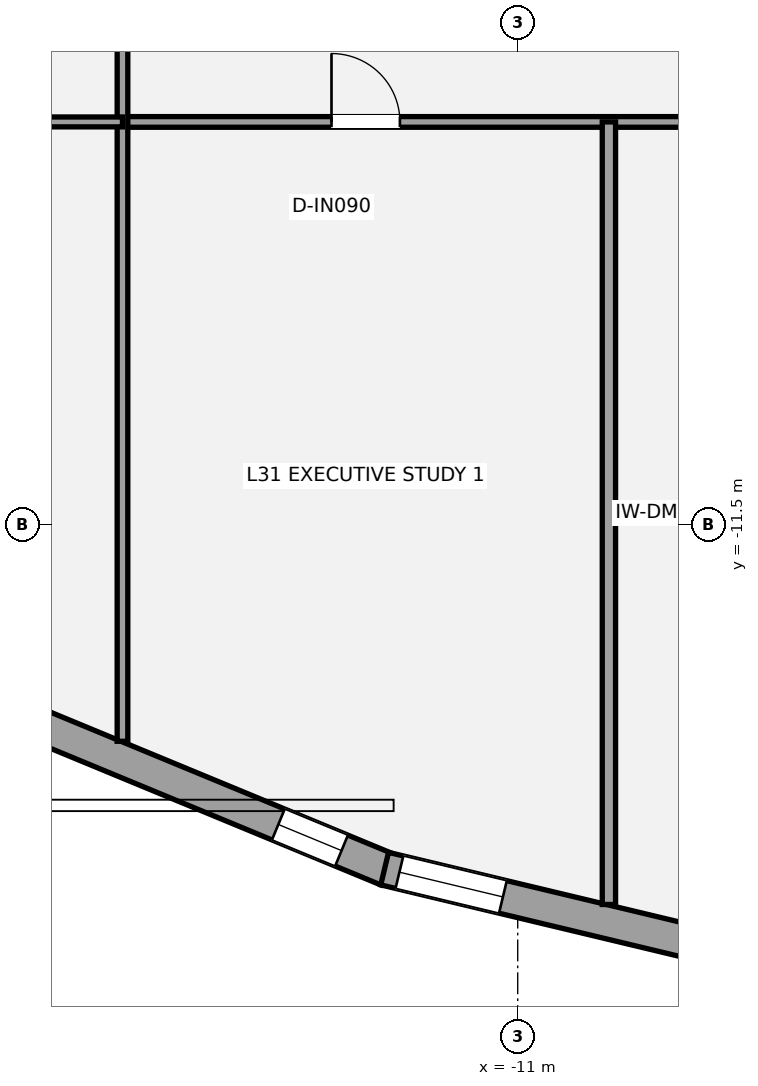
"""IFC4 building model, lengths in metres.
Left out: names, types, materials, properties, quantities, classifications, styles, units other than length and angle.
Written with IfcOpenShell. Run it as: python <this file> out.ifc"""

import sys

from ifc_helpers import new_model, si_unit, direction, frame, frame_2d, origin, place, context, subcontext, project, spatial, rectangle, extrude, element, fill, save


model = new_model("IFC4")
c1 = context("Model", 3, precision=1e-05, world=origin(), true_north=direction((0.0, 1.0)))
c2 = subcontext(c1, "Body", "Model", "MODEL_VIEW")
j1 = project(units=[si_unit("LENGTHUNIT", "METRE"), si_unit("PLANEANGLEUNIT", "RADIAN")], contexts=[c1])
p1 = place(None, origin())
s1 = spatial("IfcSite", under=j1, at=p1, CompositionType="ELEMENT")
p2 = place(p1, origin())
s2 = spatial("IfcBuilding", under=s1, at=p2, CompositionType="ELEMENT")
p3 = place(p2, frame((0.0, 0.0, 117.6)))
s3 = spatial("IfcBuildingStorey", under=s2, at=p3, CompositionType="ELEMENT", Elevation=117.6)
p4 = place(p3, frame((-12.718, -16.034, 0.0), z_axis=(0.0, 0.0, 1.0), x_axis=(-0.924140141084, 0.382053660678, 0.0)))
e1 = element("IfcWall", 1, at=p4, inside=s3, PredefinedType="STANDARD", context=c2, shape_type="SweptSolid", body=[
    extrude(rectangle(XDim=4.943, YDim=0.44, at=frame_2d((2.471, 0.0))), origin(), (0.0, 0.0, 1.0), 2.528),
])
p5 = place(p4, frame((0.649, 0.0, 0.58)))
e2 = element("IfcOpeningElement", 2, at=p5, cuts=e1, PredefinedType="OPENING", context=c2, shape_type="SweptSolid", body=[
    extrude(rectangle(XDim=0.9, YDim=1.35, at=frame_2d((0.45, 0.675))), frame((0.0, 0.23, 0.0), z_axis=(0.0, -1.0, 0.0), x_axis=(1.0, 0.0, 0.0)), (0.0, 0.0, 1.0), 0.46),
])
p6 = place(p3, frame((-7.75, -17.22, 0.0), z_axis=(0.0, 0.0, 1.0), x_axis=(-0.972539655933, 0.232737228734, 0.0)))
e3 = element("IfcWall", 3, at=p6, inside=s3, PredefinedType="STANDARD", context=c2, shape_type="SweptSolid", body=[
    extrude(rectangle(XDim=5.142, YDim=0.44, at=frame_2d((2.571, 0.0))), origin(), (0.0, 0.0, 1.0), 2.528),
])
p7 = place(p6, frame((3.542, 0.0, 0.58)))
e4 = element("IfcOpeningElement", 4, at=p7, cuts=e3, PredefinedType="OPENING", context=c2, shape_type="SweptSolid", body=[
    extrude(rectangle(XDim=1.4, YDim=1.55, at=frame_2d((0.7, 0.775))), frame((0.0, 0.23, 0.0), z_axis=(0.0, -1.0, 0.0), x_axis=(1.0, 0.0, 0.0)), (0.0, 0.0, 1.0), 0.46),
])
p8 = place(p3, frame((-16.2, -6.2, 0.0), z_axis=(0.0, 0.0, 1.0), x_axis=(1.0, 0.0, 0.0)))
e5 = element("IfcWall", 5, at=p8, inside=s3, PredefinedType="PARTITIONING", context=c2, shape_type="SweptSolid", body=[
    extrude(rectangle(XDim=34.0, YDim=0.14, at=frame_2d((17.0, 0.0))), origin(), (0.0, 0.0, 1.0), 2.688),
])
p9 = place(p8, frame((2.75, 0.0, 0.0)))
e6 = element("IfcOpeningElement", 6, at=p9, cuts=e5, PredefinedType="OPENING", context=c2, shape_type="SweptSolid", body=[
    extrude(rectangle(XDim=0.9, YDim=2.1, at=frame_2d((0.45, 1.05))), frame((0.0, 0.08, 0.0), z_axis=(0.0, -1.0, 0.0), x_axis=(1.0, 0.0, 0.0)), (0.0, 0.0, 1.0), 0.16),
])
p10 = place(p8, frame((9.45, 0.0, 0.0)))
e7 = element("IfcOpeningElement", 7, at=p10, cuts=e5, PredefinedType="OPENING", context=c2, shape_type="SweptSolid", body=[
    extrude(rectangle(XDim=0.9, YDim=2.1, at=frame_2d((0.45, 1.05))), frame((0.0, 0.08, 0.0), z_axis=(0.0, -1.0, 0.0), x_axis=(1.0, 0.0, 0.0)), (0.0, 0.0, 1.0), 0.16),
])
p11 = place(p8, frame((16.45, 0.0, 0.0)))
e8 = element("IfcOpeningElement", 8, at=p11, cuts=e5, PredefinedType="OPENING", context=c2, shape_type="SweptSolid", body=[
    extrude(rectangle(XDim=0.9, YDim=2.1, at=frame_2d((0.45, 1.05))), frame((0.0, 0.08, 0.0), z_axis=(0.0, -1.0, 0.0), x_axis=(1.0, 0.0, 0.0)), (0.0, 0.0, 1.0), 0.16),
])
p12 = place(p8, frame((22.95, 0.0, 0.0)))
e9 = element("IfcOpeningElement", 9, at=p12, cuts=e5, PredefinedType="OPENING", context=c2, shape_type="SweptSolid", body=[
    extrude(rectangle(XDim=0.9, YDim=2.1, at=frame_2d((0.45, 1.05))), frame((0.0, 0.08, 0.0), z_axis=(0.0, -1.0, 0.0), x_axis=(1.0, 0.0, 0.0)), (0.0, 0.0, 1.0), 0.16),
])
p13 = place(p8, frame((29.45, 0.0, 0.0)))
e10 = element("IfcOpeningElement", 10, at=p13, cuts=e5, PredefinedType="OPENING", context=c2, shape_type="SweptSolid", body=[
    extrude(rectangle(XDim=1.5, YDim=2.15, at=frame_2d((0.75, 1.075))), frame((0.0, 0.08, 0.0), z_axis=(0.0, -1.0, 0.0), x_axis=(1.0, 0.0, 0.0)), (0.0, 0.0, 1.0), 0.16),
])
p14 = place(p3, frame((-16.2, -14.348, 0.0), z_axis=(0.0, 0.0, 1.0), x_axis=(0.0, 1.0, 0.0)))
e11 = element("IfcWall", 11, at=p14, inside=s3, PredefinedType="PARTITIONING", context=c2, shape_type="SweptSolid", body=[
    extrude(rectangle(XDim=21.898, YDim=0.14, at=frame_2d((10.949, 0.0))), origin(), (0.0, 0.0, 1.0), 2.763),
])
p15 = place(p14, frame((10.198, 0.0, 0.0)))
e12 = element("IfcOpeningElement", 12, at=p15, cuts=e11, PredefinedType="OPENING", context=c2, shape_type="SweptSolid", body=[
    extrude(rectangle(XDim=0.9, YDim=2.1, at=frame_2d((0.45, 1.05))), frame((0.0, 0.08, 0.0), z_axis=(0.0, -1.0, 0.0), x_axis=(1.0, 0.0, 0.0)), (0.0, 0.0, 1.0), 0.16),
])
p16 = place(p14, frame((14.998, 0.0, 0.0)))
e13 = element("IfcOpeningElement", 13, at=p16, cuts=e11, PredefinedType="OPENING", context=c2, shape_type="SweptSolid", body=[
    extrude(rectangle(XDim=0.9, YDim=2.1, at=frame_2d((0.45, 1.05))), frame((0.0, 0.08, 0.0), z_axis=(0.0, -1.0, 0.0), x_axis=(1.0, 0.0, 0.0)), (0.0, 0.0, 1.0), 0.16),
])
p17 = place(p14, frame((19.373, 0.0, 0.0)))
e14 = element("IfcOpeningElement", 14, at=p17, cuts=e11, PredefinedType="OPENING", context=c2, shape_type="SweptSolid", body=[
    extrude(rectangle(XDim=0.9, YDim=2.1, at=frame_2d((0.45, 1.05))), frame((0.0, 0.08, 0.0), z_axis=(0.0, -1.0, 0.0), x_axis=(1.0, 0.0, 0.0)), (0.0, 0.0, 1.0), 0.16),
])
p18 = place(p3, frame((-9.8, -16.495, 0.0), z_axis=(0.0, 0.0, 1.0), x_axis=(0.0, 1.0, 0.0)))
e15 = element("IfcWall", 15, at=p18, inside=s3, PredefinedType="PARTITIONING", context=c2, shape_type="SweptSolid", body=[
    extrude(rectangle(XDim=10.295, YDim=0.175, at=frame_2d((5.148, 0.0))), origin(), (0.0, 0.0, 1.0), 3.31),
])
p19 = place(p3, frame((-24.737, -6.2, 0.0), z_axis=(0.0, 0.0, 1.0), x_axis=(1.0, 0.0, 0.0)))
e16 = element("IfcWall", 16, at=p19, inside=s3, PredefinedType="PARTITIONING", context=c2, shape_type="SweptSolid", body=[
    extrude(rectangle(XDim=8.537, YDim=0.13, at=frame_2d((4.268, 0.0))), origin(), (0.0, 0.0, 1.0), 2.688),
])
p20 = place(p19, frame((1.23, 0.0, 0.0)))
e17 = element("IfcOpeningElement", 17, at=p20, cuts=e16, PredefinedType="OPENING", context=c2, shape_type="SweptSolid", body=[
    extrude(rectangle(XDim=0.9, YDim=2.1, at=frame_2d((0.45, 1.05))), frame((0.0, 0.075, 0.0), z_axis=(0.0, -1.0, 0.0), x_axis=(1.0, 0.0, 0.0)), (0.0, 0.0, 1.0), 0.15),
])
p21 = place(p5, origin())
e18 = element("IfcWindow", 18, at=p21, inside=s3, PartitioningType="SINGLE_PANEL", PredefinedType="WINDOW", context=c2, shape_type="SweptSolid", body=[
    extrude(rectangle(XDim=0.9, YDim=1.35, at=frame_2d((0.45, 0.675))), frame((0.0, -0.01, 0.0), z_axis=(0.0, -1.0, 0.0), x_axis=(1.0, 0.0, 0.0)), (0.0, 0.0, 1.0), 0.06),
])
fill(e2, e18)
p22 = place(p7, origin())
e19 = element("IfcWindow", 19, at=p22, inside=s3, PartitioningType="SINGLE_PANEL", PredefinedType="WINDOW", context=c2, shape_type="SweptSolid", body=[
    extrude(rectangle(XDim=1.4, YDim=1.55, at=frame_2d((0.7, 0.775))), frame((0.0, -0.01, 0.0), z_axis=(0.0, -1.0, 0.0), x_axis=(1.0, 0.0, 0.0)), (0.0, 0.0, 1.0), 0.06),
])
fill(e4, e19)
p23 = place(p9, origin())
e20 = element("IfcDoor", 20, at=p23, inside=s3, OperationType="SINGLE_SWING_LEFT", PredefinedType="DOOR", context=c2, shape_type="SweptSolid", body=[
    extrude(rectangle(XDim=0.9, YDim=2.1, at=frame_2d((0.45, 1.05))), frame((0.0, 0.025, 0.0), z_axis=(0.0, -1.0, 0.0), x_axis=(1.0, 0.0, 0.0)), (0.0, 0.0, 1.0), 0.05),
])
fill(e6, e20)
save(model, sys.argv[1])
